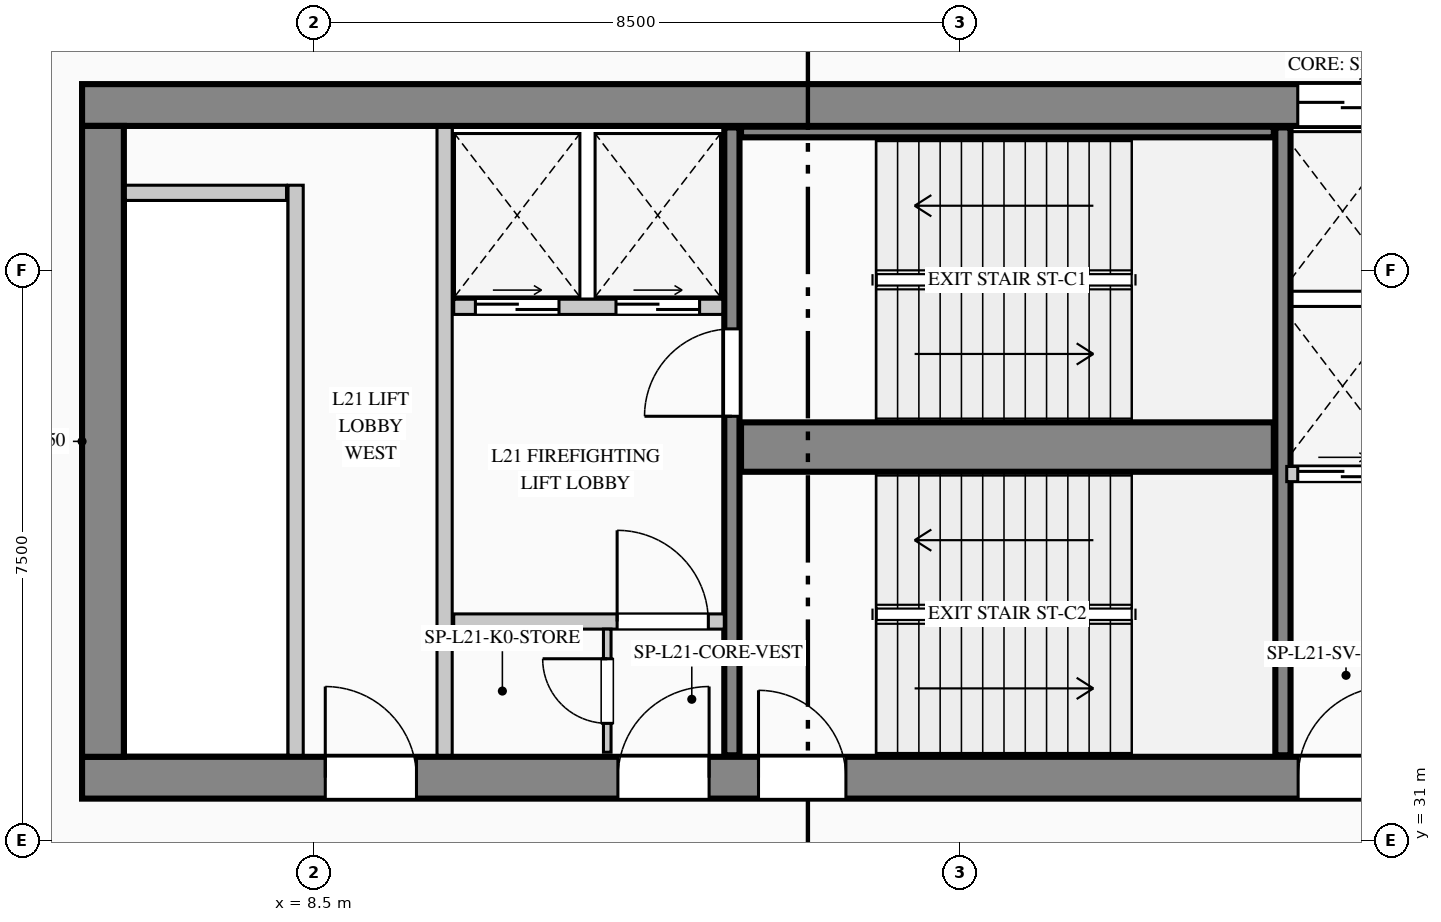
"""IFC4 building model, lengths in metres.
Left out: names, types, materials, properties, quantities, classifications, styles, units other than length and angle.
Written with IfcOpenShell. Run it as: python <this file> out.ifc"""

import sys

from ifc_helpers import new_model, si_unit, direction, frame, frame_2d, origin, place, context, subcontext, project, spatial, rectangle, extrude, element, fill, save


model = new_model("IFC4")
c1 = context("Model", 3, precision=1e-05, world=origin(), true_north=direction((0.0, 1.0)))
c2 = subcontext(c1, "Body", "Model", "MODEL_VIEW")
j1 = project(units=[si_unit("LENGTHUNIT", "METRE"), si_unit("PLANEANGLEUNIT", "RADIAN")], contexts=[c1])
p1 = place(None, origin())
s1 = spatial("IfcSite", under=j1, at=p1, CompositionType="ELEMENT")
p2 = place(p1, origin())
s2 = spatial("IfcBuilding", under=s1, at=p2, CompositionType="ELEMENT")
p3 = place(p2, frame((0.0, 0.0, 93.0)))
s3 = spatial("IfcBuildingStorey", under=s2, at=p3, CompositionType="ELEMENT", Elevation=93.0)
p4 = place(p3, frame((5.45, 40.675, 0.0), z_axis=(0.0, 0.0, 1.0), x_axis=(1.0, 0.0, 0.0)))
e1 = element("IfcWall", 1, at=p4, inside=s3, PredefinedType="SHEAR", context=c2, shape_type="SweptSolid", body=[
    extrude(rectangle(XDim=17.95, YDim=0.55, at=frame_2d((8.975, 0.0))), origin(), (0.0, 0.0, 1.0), 4.4),
])
p5 = place(p4, frame((15.995, 0.0, 0.0)))
e2 = element("IfcOpeningElement", 2, at=p5, cuts=e1, PredefinedType="OPENING", context=c2, shape_type="SweptSolid", body=[
    extrude(rectangle(XDim=1.18, YDim=2.25, at=frame_2d((0.59, 1.125))), frame((0.0, 0.285, 0.0), z_axis=(0.0, -1.0, 0.0), x_axis=(1.0, 0.0, 0.0)), (0.0, 0.0, 1.0), 0.57),
])
p6 = place(p3, frame((5.45, 31.825, 0.0), z_axis=(0.0, 0.0, 1.0), x_axis=(1.0, 0.0, 0.0)))
e3 = element("IfcWall", 3, at=p6, inside=s3, PredefinedType="SHEAR", context=c2, shape_type="SweptSolid", body=[
    extrude(rectangle(XDim=17.95, YDim=0.55, at=frame_2d((8.975, 0.0))), origin(), (0.0, 0.0, 1.0), 4.4),
])
p7 = place(p6, frame((3.2, 0.0, 0.0)))
e4 = element("IfcOpeningElement", 4, at=p7, cuts=e3, PredefinedType="OPENING", context=c2, shape_type="SweptSolid", body=[
    extrude(rectangle(XDim=1.2, YDim=2.2, at=frame_2d((0.6, 1.1))), frame((0.0, 0.285, 0.0), z_axis=(0.0, -1.0, 0.0), x_axis=(1.0, 0.0, 0.0)), (0.0, 0.0, 1.0), 0.57),
])
p8 = place(p6, frame((7.05, 0.0, 0.0)))
e5 = element("IfcOpeningElement", 5, at=p8, cuts=e3, PredefinedType="OPENING", context=c2, shape_type="SweptSolid", body=[
    extrude(rectangle(XDim=1.2, YDim=2.2, at=frame_2d((0.6, 1.1))), frame((0.0, 0.285, 0.0), z_axis=(0.0, -1.0, 0.0), x_axis=(1.0, 0.0, 0.0)), (0.0, 0.0, 1.0), 0.57),
])
p9 = place(p6, frame((8.9, 0.0, 0.0)))
e6 = element("IfcOpeningElement", 6, at=p9, cuts=e3, PredefinedType="OPENING", context=c2, shape_type="SweptSolid", body=[
    extrude(rectangle(XDim=1.15, YDim=2.2, at=frame_2d((0.575, 1.1))), frame((0.0, 0.285, 0.0), z_axis=(0.0, -1.0, 0.0), x_axis=(1.0, 0.0, 0.0)), (0.0, 0.0, 1.0), 0.57),
])
p10 = place(p6, frame((16.0, 0.0, 0.0)))
e7 = element("IfcOpeningElement", 7, at=p10, cuts=e3, PredefinedType="OPENING", context=c2, shape_type="SweptSolid", body=[
    extrude(rectangle(XDim=1.2, YDim=2.2, at=frame_2d((0.6, 1.1))), frame((0.0, 0.285, 0.0), z_axis=(0.0, -1.0, 0.0), x_axis=(1.0, 0.0, 0.0)), (0.0, 0.0, 1.0), 0.57),
])
p11 = place(p3, frame((5.725, 32.1, 0.0), z_axis=(0.0, 0.0, 1.0), x_axis=(0.0, 1.0, 0.0)))
e8 = element("IfcWall", 8, at=p11, inside=s3, PredefinedType="SHEAR", context=c2, shape_type="SweptSolid", body=[
    extrude(rectangle(XDim=8.3, YDim=0.55, at=frame_2d((4.15, 0.0))), origin(), (0.0, 0.0, 1.0), 4.4),
])
p12 = place(p3, frame((14.0, 32.12, 0.0), z_axis=(0.0, 0.0, 1.0), x_axis=(0.0, 1.0, 0.0)))
e9 = element("IfcWall", 9, at=p12, inside=s3, PredefinedType="SHEAR", context=c2, shape_type="SweptSolid", body=[
    extrude(rectangle(XDim=8.26, YDim=0.2, at=frame_2d((4.13, 0.0))), origin(), (0.0, 0.0, 1.0), 4.4),
])
p13 = place(p12, frame((4.46, 0.0, 0.0)))
e10 = element("IfcOpeningElement", 10, at=p13, cuts=e9, PredefinedType="OPENING", context=c2, shape_type="SweptSolid", body=[
    extrude(rectangle(XDim=1.15, YDim=2.2, at=frame_2d((0.575, 1.1))), frame((0.0, 0.11, 0.0), z_axis=(0.0, -1.0, 0.0), x_axis=(1.0, 0.0, 0.0)), (0.0, 0.0, 1.0), 0.22),
])
p14 = place(p3, frame((14.12, 36.175, 0.0), z_axis=(0.0, 0.0, 1.0), x_axis=(1.0, 0.0, 0.0)))
e11 = element("IfcWall", 11, at=p14, inside=s3, PredefinedType="SHEAR", context=c2, shape_type="SweptSolid", body=[
    extrude(rectangle(XDim=7.01, YDim=0.65, at=frame_2d((3.505, 0.0))), origin(), (0.0, 0.0, 1.0), 4.4),
])
p15 = place(p3, frame((21.25, 32.12, 0.0), z_axis=(0.0, 0.0, 1.0), x_axis=(0.0, 1.0, 0.0)))
e12 = element("IfcWall", 12, at=p15, inside=s3, PredefinedType="SHEAR", context=c2, shape_type="SweptSolid", body=[
    extrude(rectangle(XDim=8.26, YDim=0.2, at=frame_2d((4.13, 0.0))), origin(), (0.0, 0.0, 1.0), 4.4),
])
p16 = place(p3, frame((14.12, 40.32, 0.0), z_axis=(0.0, 0.0, 1.0), x_axis=(1.0, 0.0, 0.0)))
e13 = element("IfcWall", 13, at=p16, inside=s3, PredefinedType="SHEAR", context=c2, shape_type="SweptSolid", body=[
    extrude(rectangle(XDim=7.01, YDim=0.14, at=frame_2d((3.505, 0.0))), origin(), (0.0, 0.0, 1.0), 4.4),
])
p17 = place(p3, frame((8.523, 4.84, 0.0), z_axis=(0.0, 0.0, 1.0), x_axis=(-0.150394554312, 0.988626055712, 0.0)))
e14 = element("IfcWall", 14, at=p17, inside=s3, PredefinedType="STANDARD", context=c2, shape_type="SweptSolid", body=[
    extrude(rectangle(XDim=36.738, YDim=0.28, at=frame_2d((18.369, 0.0))), origin(), (0.0, 0.0, 1.0), 4.115),
])
p18 = place(p17, frame((22.612, 0.0, 0.9)))
e15 = element("IfcOpeningElement", 15, at=p18, cuts=e14, PredefinedType="OPENING", context=c2, shape_type="SweptSolid", body=[
    extrude(rectangle(XDim=1.8, YDim=2.1, at=frame_2d((0.9, 1.05))), frame((0.0, 0.15, 0.0), z_axis=(0.0, -1.0, 0.0), x_axis=(1.0, 0.0, 0.0)), (0.0, 0.0, 1.0), 0.3),
])
p19 = place(p3, frame((8.26, 32.12, 0.0), z_axis=(0.0, 0.0, 1.0), x_axis=(0.0, 1.0, 0.0)))
e16 = element("IfcWall", 16, at=p19, inside=s3, PredefinedType="PARTITIONING", context=c2, shape_type="SweptSolid", body=[
    extrude(rectangle(XDim=7.5, YDim=0.2, at=frame_2d((3.75, 0.0))), origin(), (0.0, 0.0, 1.0), 4.115),
])
p20 = place(p3, frame((6.02, 39.52, 0.0), z_axis=(0.0, 0.0, 1.0), x_axis=(1.0, 0.0, 0.0)))
e17 = element("IfcWall", 17, at=p20, inside=s3, PredefinedType="PARTITIONING", context=c2, shape_type="SweptSolid", body=[
    extrude(rectangle(XDim=2.12, YDim=0.2, at=frame_2d((1.06, 0.0))), origin(), (0.0, 0.0, 1.0), 4.115),
])
p21 = place(p3, frame((10.22, 32.12, 0.0), z_axis=(0.0, 0.0, 1.0), x_axis=(0.0, 1.0, 0.0)))
e18 = element("IfcWall", 18, at=p21, inside=s3, PredefinedType="PARTITIONING", context=c2, shape_type="SweptSolid", body=[
    extrude(rectangle(XDim=8.26, YDim=0.2, at=frame_2d((4.13, 0.0))), origin(), (0.0, 0.0, 1.0), 4.115),
])
p22 = place(p3, frame((10.34, 38.02, 0.0), z_axis=(0.0, 0.0, 1.0), x_axis=(1.0, 0.0, 0.0)))
e19 = element("IfcWall", 19, at=p22, inside=s3, PredefinedType="PARTITIONING", context=c2, shape_type="SweptSolid", body=[
    extrude(rectangle(XDim=3.54, YDim=0.2, at=frame_2d((1.77, 0.0))), origin(), (0.0, 0.0, 1.0), 4.115),
])
p23 = place(p22, frame((0.285, 0.0, 0.0)))
e20 = element("IfcOpeningElement", 20, at=p23, cuts=e19, PredefinedType="OPENING", context=c2, shape_type="SweptSolid", body=[
    extrude(rectangle(XDim=1.1, YDim=2.2, at=frame_2d((0.55, 1.1))), frame((0.0, 0.11, 0.0), z_axis=(0.0, -1.0, 0.0), x_axis=(1.0, 0.0, 0.0)), (0.0, 0.0, 1.0), 0.22),
])
p24 = place(p22, frame((2.135, 0.0, 0.0)))
e21 = element("IfcOpeningElement", 21, at=p24, cuts=e19, PredefinedType="OPENING", context=c2, shape_type="SweptSolid", body=[
    extrude(rectangle(XDim=1.1, YDim=2.2, at=frame_2d((0.55, 1.1))), frame((0.0, 0.11, 0.0), z_axis=(0.0, -1.0, 0.0), x_axis=(1.0, 0.0, 0.0)), (0.0, 0.0, 1.0), 0.22),
])
p25 = place(p3, frame((10.34, 33.88, 0.0), z_axis=(0.0, 0.0, 1.0), x_axis=(1.0, 0.0, 0.0)))
e22 = element("IfcWall", 22, at=p25, inside=s3, PredefinedType="PARTITIONING", context=c2, shape_type="SweptSolid", body=[
    extrude(rectangle(XDim=3.56, YDim=0.2, at=frame_2d((1.78, 0.0))), origin(), (0.0, 0.0, 1.0), 4.115),
])
p26 = place(p25, frame((2.15, 0.0, 0.0)))
e23 = element("IfcOpeningElement", 23, at=p26, cuts=e22, PredefinedType="OPENING", context=c2, shape_type="SweptSolid", body=[
    extrude(rectangle(XDim=1.2, YDim=2.2, at=frame_2d((0.6, 1.1))), frame((0.0, 0.11, 0.0), z_axis=(0.0, -1.0, 0.0), x_axis=(1.0, 0.0, 0.0)), (0.0, 0.0, 1.0), 0.22),
])
p27 = place(p3, frame((12.36, 32.16, 0.0), z_axis=(0.0, 0.0, 1.0), x_axis=(0.0, 1.0, 0.0)))
e24 = element("IfcWall", 24, at=p27, inside=s3, PredefinedType="PARTITIONING", context=c2, shape_type="SweptSolid", body=[
    extrude(rectangle(XDim=1.62, YDim=0.1, at=frame_2d((0.81, 0.0))), origin(), (0.0, 0.0, 1.0), 4.115),
])
p28 = place(p27, frame((0.38, 0.0, 0.0)))
e25 = element("IfcOpeningElement", 25, at=p28, cuts=e24, PredefinedType="OPENING", context=c2, shape_type="SweptSolid", body=[
    extrude(rectangle(XDim=0.85, YDim=2.1, at=frame_2d((0.425, 1.05))), frame((0.0, 0.06, 0.0), z_axis=(0.0, -1.0, 0.0), x_axis=(1.0, 0.0, 0.0)), (0.0, 0.0, 1.0), 0.12),
])
p29 = place(p3, frame((21.3, 35.82, 0.0), z_axis=(0.0, 0.0, 1.0), x_axis=(1.0, 0.0, 0.0)))
e26 = element("IfcWall", 26, at=p29, inside=s3, PredefinedType="PARTITIONING", context=c2, shape_type="SweptSolid", body=[
    extrude(rectangle(XDim=1.5, YDim=0.2, at=frame_2d((0.75, 0.0))), origin(), (0.0, 0.0, 1.0), 4.115),
])
p30 = place(p29, frame((0.145, 0.0, 0.0)))
e27 = element("IfcOpeningElement", 27, at=p30, cuts=e26, PredefinedType="OPENING", context=c2, shape_type="SweptSolid", body=[
    extrude(rectangle(XDim=1.18, YDim=2.25, at=frame_2d((0.59, 1.125))), frame((0.0, 0.11, 0.0), z_axis=(0.0, -1.0, 0.0), x_axis=(1.0, 0.0, 0.0)), (0.0, 0.0, 1.0), 0.22),
])
p31 = place(p7, origin())
e28 = element("IfcDoor", 28, at=p31, inside=s3, OperationType="SINGLE_SWING_LEFT", PredefinedType="DOOR", context=c2, shape_type="SweptSolid", body=[
    extrude(rectangle(XDim=1.2, YDim=2.2, at=frame_2d((0.6, 1.1))), frame((0.0, 0.025, 0.0), z_axis=(0.0, -1.0, 0.0), x_axis=(1.0, 0.0, 0.0)), (0.0, 0.0, 1.0), 0.05),
])
fill(e4, e28)
p32 = place(p8, origin())
e29 = element("IfcDoor", 29, at=p32, inside=s3, OperationType="SINGLE_SWING_RIGHT", PredefinedType="DOOR", context=c2, shape_type="SweptSolid", body=[
    extrude(rectangle(XDim=1.2, YDim=2.2, at=frame_2d((0.6, 1.1))), frame((0.0, 0.025, 0.0), z_axis=(0.0, -1.0, 0.0), x_axis=(1.0, 0.0, 0.0)), (0.0, 0.0, 1.0), 0.05),
])
fill(e5, e29)
p33 = place(p9, origin())
e30 = element("IfcDoor", 30, at=p33, inside=s3, OperationType="SINGLE_SWING_LEFT", PredefinedType="DOOR", context=c2, shape_type="SweptSolid", body=[
    extrude(rectangle(XDim=1.15, YDim=2.2, at=frame_2d((0.575, 1.1))), frame((0.0, 0.025, 0.0), z_axis=(0.0, -1.0, 0.0), x_axis=(1.0, 0.0, 0.0)), (0.0, 0.0, 1.0), 0.05),
])
fill(e6, e30)
p34 = place(p10, origin())
e31 = element("IfcDoor", 31, at=p34, inside=s3, OperationType="SINGLE_SWING_RIGHT", PredefinedType="DOOR", context=c2, shape_type="SweptSolid", body=[
    extrude(rectangle(XDim=1.2, YDim=2.2, at=frame_2d((0.6, 1.1))), frame((0.0, 0.025, 0.0), z_axis=(0.0, -1.0, 0.0), x_axis=(1.0, 0.0, 0.0)), (0.0, 0.0, 1.0), 0.05),
])
fill(e7, e31)
p35 = place(p26, origin())
e32 = element("IfcDoor", 32, at=p35, inside=s3, OperationType="SINGLE_SWING_LEFT", PredefinedType="DOOR", context=c2, shape_type="SweptSolid", body=[
    extrude(rectangle(XDim=1.2, YDim=2.2, at=frame_2d((0.6, 1.1))), frame((0.0, 0.025, 0.0), z_axis=(0.0, -1.0, 0.0), x_axis=(1.0, 0.0, 0.0)), (0.0, 0.0, 1.0), 0.05),
])
fill(e23, e32)
p36 = place(p28, origin())
e33 = element("IfcDoor", 33, at=p36, inside=s3, OperationType="SINGLE_SWING_RIGHT", PredefinedType="DOOR", context=c2, shape_type="SweptSolid", body=[
    extrude(rectangle(XDim=0.85, YDim=2.1, at=frame_2d((0.425, 1.05))), frame((0.0, 0.025, 0.0), z_axis=(0.0, -1.0, 0.0), x_axis=(1.0, 0.0, 0.0)), (0.0, 0.0, 1.0), 0.05),
])
fill(e25, e33)
p37 = place(p13, origin())
e34 = element("IfcDoor", 34, at=p37, inside=s3, OperationType="SINGLE_SWING_LEFT", PredefinedType="DOOR", context=c2, shape_type="SweptSolid", body=[
    extrude(rectangle(XDim=1.15, YDim=2.2, at=frame_2d((0.575, 1.1))), frame((0.0, 0.025, 0.0), z_axis=(0.0, -1.0, 0.0), x_axis=(1.0, 0.0, 0.0)), (0.0, 0.0, 1.0), 0.05),
])
fill(e10, e34)
p38 = place(p23, origin())
e35 = element("IfcDoor", 35, at=p38, inside=s3, OperationType="DOUBLE_DOOR_SLIDING", PredefinedType="DOOR", context=c2, shape_type="SweptSolid", body=[
    extrude(rectangle(XDim=1.1, YDim=2.2, at=frame_2d((0.55, 1.1))), frame((0.0, 0.025, 0.0), z_axis=(0.0, -1.0, 0.0), x_axis=(1.0, 0.0, 0.0)), (0.0, 0.0, 1.0), 0.05),
])
fill(e20, e35)
p39 = place(p24, origin())
e36 = element("IfcDoor", 36, at=p39, inside=s3, OperationType="DOUBLE_DOOR_SLIDING", PredefinedType="DOOR", context=c2, shape_type="SweptSolid", body=[
    extrude(rectangle(XDim=1.1, YDim=2.2, at=frame_2d((0.55, 1.1))), frame((0.0, 0.025, 0.0), z_axis=(0.0, -1.0, 0.0), x_axis=(1.0, 0.0, 0.0)), (0.0, 0.0, 1.0), 0.05),
])
fill(e21, e36)
p40 = place(p5, origin())
e37 = element("IfcDoor", 37, at=p40, inside=s3, OperationType="DOUBLE_DOOR_SLIDING", PredefinedType="DOOR", context=c2, shape_type="SweptSolid", body=[
    extrude(rectangle(XDim=1.18, YDim=2.25, at=frame_2d((0.59, 1.125))), frame((0.0, 0.025, 0.0), z_axis=(0.0, -1.0, 0.0), x_axis=(1.0, 0.0, 0.0)), (0.0, 0.0, 1.0), 0.05),
])
fill(e2, e37)
p41 = place(p30, origin())
e38 = element("IfcDoor", 38, at=p41, inside=s3, OperationType="DOUBLE_DOOR_SLIDING", PredefinedType="DOOR", context=c2, shape_type="SweptSolid", body=[
    extrude(rectangle(XDim=1.18, YDim=2.25, at=frame_2d((0.59, 1.125))), frame((0.0, 0.025, 0.0), z_axis=(0.0, -1.0, 0.0), x_axis=(1.0, 0.0, 0.0)), (0.0, 0.0, 1.0), 0.05),
])
fill(e27, e38)
save(model, sys.argv[1])
